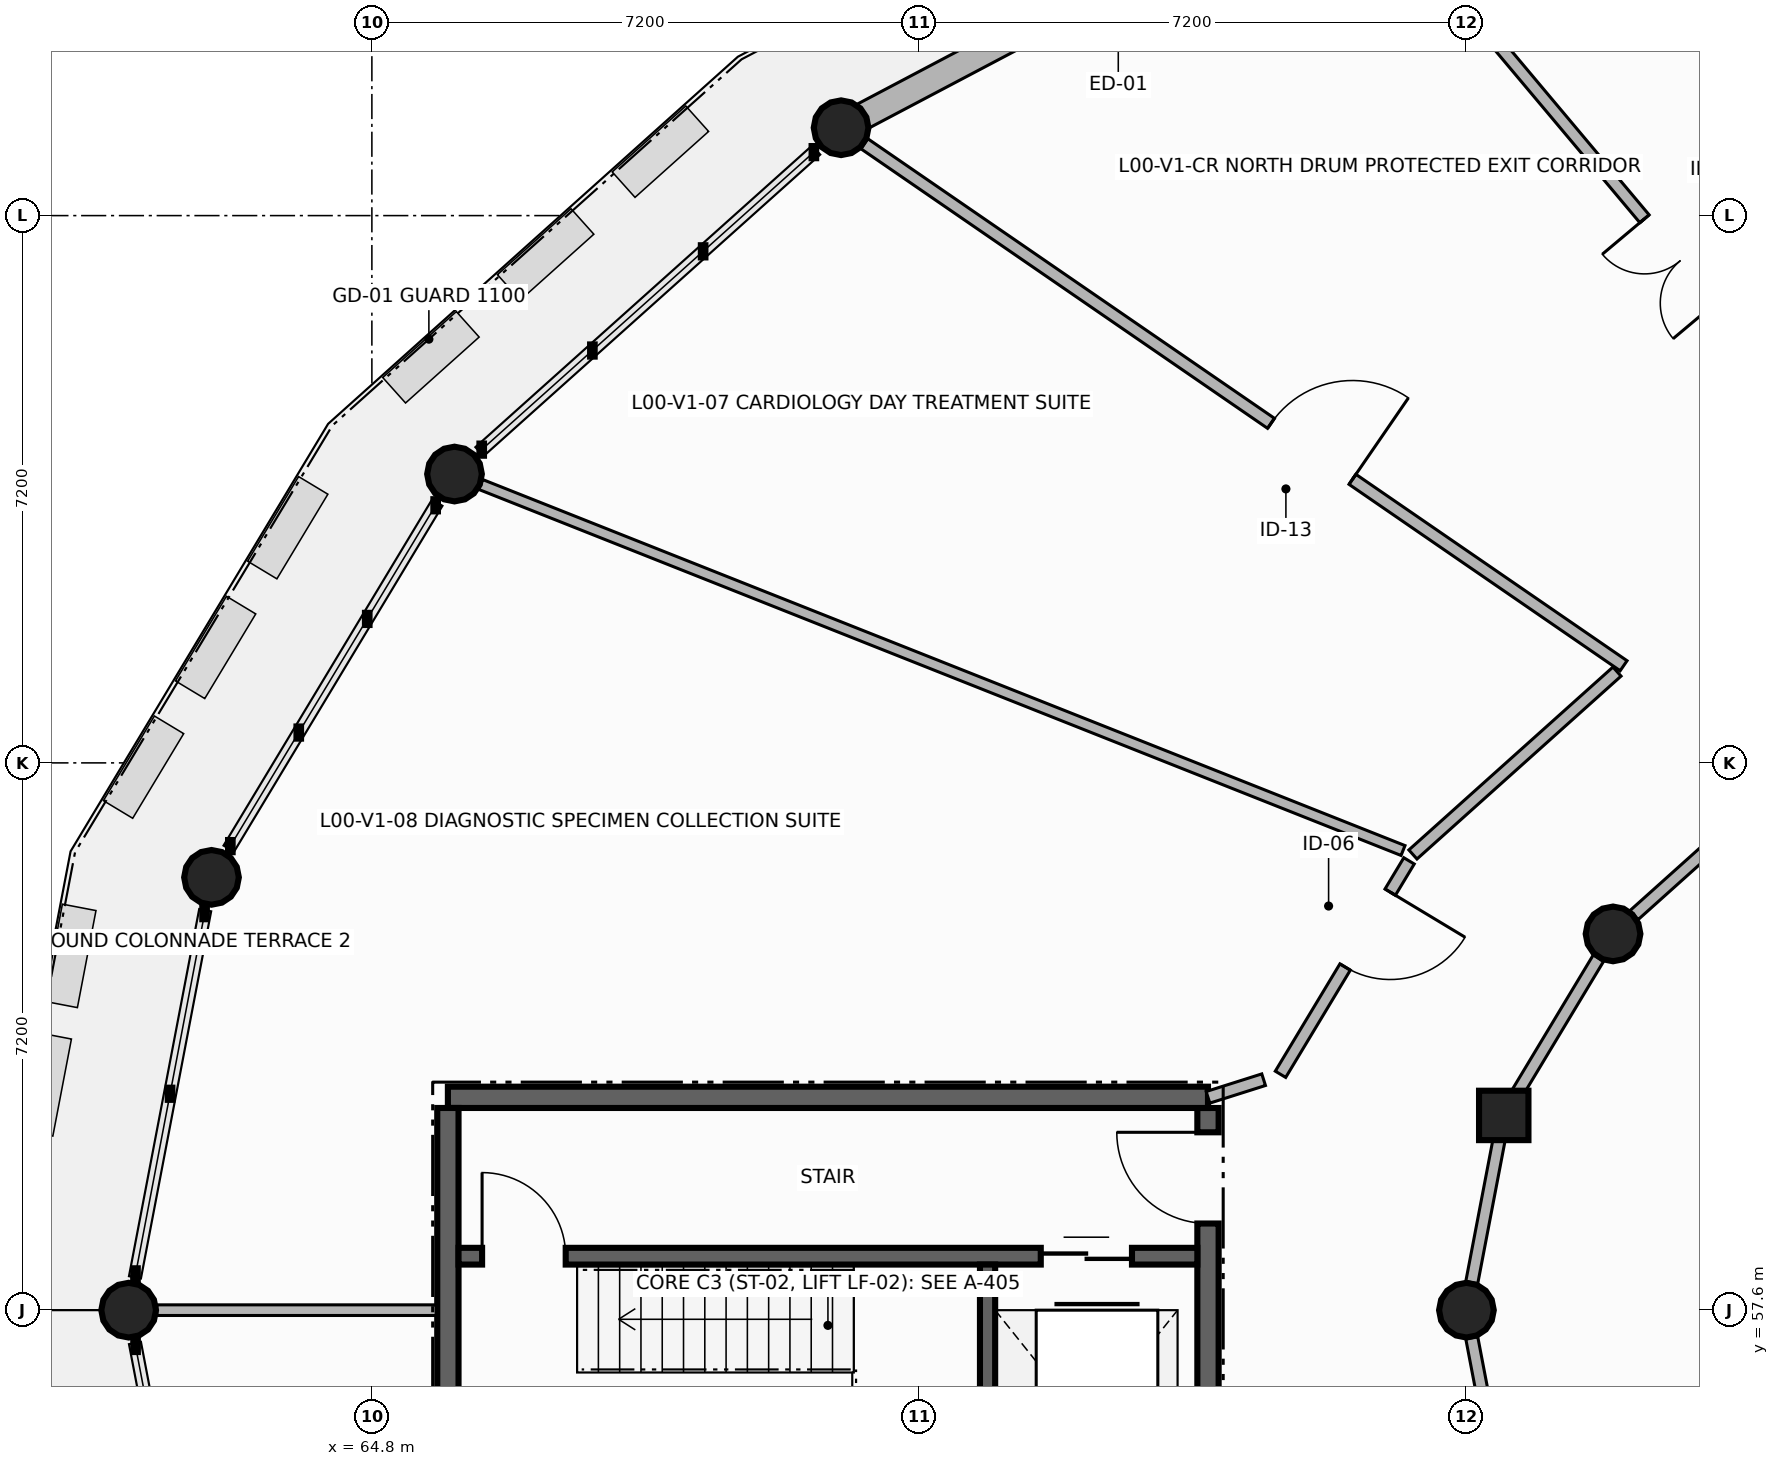
"""IFC4 building model, lengths in metres.
Left out: names, types, materials, properties, quantities, classifications, styles, units other than length and angle.
Written with IfcOpenShell. Run it as: python <this file> out.ifc"""

import sys

from ifc_helpers import new_model, si_unit, direction, frame, frame_2d, origin, origin_2d, place, context, subcontext, project, spatial, rectangle, circle, extrude, element, fill, save


model = new_model("IFC4")
c1 = context("Model", 3, precision=1e-05, world=origin(), true_north=direction((0.0, 1.0)))
c2 = subcontext(c1, "Body", "Model", "MODEL_VIEW")
j1 = project(units=[si_unit("LENGTHUNIT", "METRE"), si_unit("PLANEANGLEUNIT", "RADIAN")], contexts=[c1])
p1 = place(None, origin())
s1 = spatial("IfcSite", under=j1, at=p1, CompositionType="ELEMENT")
p2 = place(p1, origin())
s2 = spatial("IfcBuilding", under=s1, at=p2, CompositionType="ELEMENT")
p3 = place(p2, origin())
s3 = spatial("IfcBuildingStorey", under=s2, at=p3, CompositionType="ELEMENT", Elevation=0.0)
for number, where, z_axis, x_axis in (
    (1, (70.973, 73.156, -0.38), (0.0, 0.0, 1.0), (1.0, 0.0, 0.0)),
    (2, (65.887, 68.6, -0.38), (0.0, 0.0, 1.0), (1.0, 0.0, 0.0)),
    (3, (81.129, 62.55, -0.38), (0.0, 0.0, 1.0), (1.0, 0.0, 0.0)),
    (4, (62.69, 63.294, -0.38), (0.0, 0.0, 1.0), (1.0, 0.0, 0.0)),
):
    element("IfcColumn", number, at=place(p3, frame(where, z_axis=z_axis, x_axis=x_axis)), inside=s3, PredefinedType="COLUMN", context=c2, shape_type="SweptSolid", body=[
        extrude(circle(Radius=0.36, at=origin_2d()), origin(), (0.0, 0.0, 1.0), 4.59),
    ])
p4 = place(p3, frame((79.691, 60.162, -0.38), z_axis=(0.0, 0.0, 1.0), x_axis=(1.0, 0.0, 0.0)))
e5 = element("IfcColumn", 5, at=p4, inside=s3, PredefinedType="COLUMN", context=c2, shape_type="SweptSolid", body=[
    extrude(rectangle(XDim=0.65, YDim=0.65, at=origin_2d()), origin(), (0.0, 0.0, 1.0), 4.59),
])
for number, where, z_axis, x_axis in (
    (6, (61.6, 57.6, -0.38), (0.0, 0.0, 1.0), (1.0, 0.0, 0.0)),
    (7, (79.2, 57.6, -0.38), (0.0, 0.0, 1.0), (1.0, 0.0, 0.0)),
):
    element("IfcColumn", number, at=place(p3, frame(where, z_axis=z_axis, x_axis=x_axis)), inside=s3, PredefinedType="COLUMN", context=c2, shape_type="SweptSolid", body=[
        extrude(circle(Radius=0.36, at=origin_2d()), origin(), (0.0, 0.0, 1.0), 4.59),
    ])
p5 = place(p3, frame((77.6, 76.653, 0.0), z_axis=(0.0, 0.0, 1.0), x_axis=(-0.8844187475, -0.466694202954, 0.0)))
e8 = element("IfcWall", 8, at=p5, inside=s3, PredefinedType="SOLIDWALL", context=c2, shape_type="SweptSolid", body=[
    extrude(rectangle(XDim=7.493, YDim=0.35, at=frame_2d((3.747, 0.0))), origin(), (0.0, 0.0, 1.0), 3.65),
])
p6 = place(p5, frame((2.647, 0.0, 0.0)))
e9 = element("IfcOpeningElement", 9, at=p6, cuts=e8, PredefinedType="OPENING", context=c2, shape_type="SweptSolid", body=[
    extrude(rectangle(XDim=2.2, YDim=2.6, at=frame_2d((1.1, 1.3))), frame((0.0, 0.185, 0.0), z_axis=(0.0, -1.0, 0.0), x_axis=(1.0, 0.0, 0.0)), (0.0, 0.0, 1.0), 0.37),
])
p7 = place(p3, frame((75.8, 54.54, 0.0), z_axis=(0.0, 0.0, 1.0), x_axis=(0.0, 1.0, 0.0)))
e10 = element("IfcWall", 10, at=p7, inside=s3, PredefinedType="SHEAR", context=c2, shape_type="SweptSolid", body=[
    extrude(rectangle(XDim=5.72, YDim=0.28, at=frame_2d((2.86, 0.0))), origin(), (0.0, 0.0, 1.0), 4.21),
])
p8 = place(p7, frame((4.2, 0.0, 0.0)))
e11 = element("IfcOpeningElement", 11, at=p8, cuts=e10, PredefinedType="OPENING", context=c2, shape_type="SweptSolid", body=[
    extrude(rectangle(XDim=1.2, YDim=2.25, at=frame_2d((0.6, 1.125))), frame((0.0, 0.15, 0.0), z_axis=(0.0, -1.0, 0.0), x_axis=(1.0, 0.0, 0.0)), (0.0, 0.0, 1.0), 0.3),
])
p9 = place(p3, frame((75.8, 60.4, 0.0), z_axis=(0.0, 0.0, 1.0), x_axis=(-1.0, 0.0, 0.0)))
e12 = element("IfcWall", 12, at=p9, inside=s3, PredefinedType="SHEAR", context=c2, shape_type="SweptSolid", body=[
    extrude(rectangle(XDim=10.0, YDim=0.28, at=frame_2d((5.0, 0.0))), origin(), (0.0, 0.0, 1.0), 4.21),
])
p10 = place(p3, frame((65.8, 60.26, 0.0), z_axis=(0.0, 0.0, 1.0), x_axis=(0.0, -1.0, 0.0)))
e13 = element("IfcWall", 13, at=p10, inside=s3, PredefinedType="SHEAR", context=c2, shape_type="SweptSolid", body=[
    extrude(rectangle(XDim=5.72, YDim=0.28, at=frame_2d((2.86, 0.0))), origin(), (0.0, 0.0, 1.0), 4.21),
])
p11 = place(p3, frame((65.94, 58.31, 0.0), z_axis=(0.0, 0.0, 1.0), x_axis=(1.0, 0.0, 0.0)))
e14 = element("IfcWall", 14, at=p11, inside=s3, PredefinedType="SHEAR", context=c2, shape_type="SweptSolid", body=[
    extrude(rectangle(XDim=9.72, YDim=0.22, at=frame_2d((4.86, 0.0))), origin(), (0.0, 0.0, 1.0), 4.21),
])
p12 = place(p11, frame((0.31, 0.0, 0.0)))
e15 = element("IfcOpeningElement", 15, at=p12, cuts=e14, PredefinedType="OPENING", context=c2, shape_type="SweptSolid", body=[
    extrude(rectangle(XDim=1.1, YDim=2.15, at=frame_2d((0.55, 1.075))), frame((0.0, 0.12, 0.0), z_axis=(0.0, -1.0, 0.0), x_axis=(1.0, 0.0, 0.0)), (0.0, 0.0, 1.0), 0.24),
])
p13 = place(p11, frame((7.66, 0.0, 0.0)))
e16 = element("IfcOpeningElement", 16, at=p13, cuts=e14, PredefinedType="OPENING", context=c2, shape_type="SweptSolid", body=[
    extrude(rectangle(XDim=1.2, YDim=2.2, at=frame_2d((0.6, 1.1))), frame((0.0, 0.12, 0.0), z_axis=(0.0, -1.0, 0.0), x_axis=(1.0, 0.0, 0.0)), (0.0, 0.0, 1.0), 0.24),
])
p14 = place(p3, frame((72.9, 54.54, 0.0), z_axis=(0.0, 0.0, 1.0), x_axis=(0.0, 1.0, 0.0)))
e17 = element("IfcWall", 17, at=p14, inside=s3, PredefinedType="SHEAR", context=c2, shape_type="SweptSolid", body=[
    extrude(rectangle(XDim=3.66, YDim=0.2, at=frame_2d((1.83, 0.0))), origin(), (0.0, 0.0, 1.0), 4.21),
])
p15 = place(p3, frame((83.168, 64.377, 0.0), z_axis=(0.0, 0.0, 1.0), x_axis=(-0.744723202555, -0.667373472335, 0.0)))
e18 = element("IfcWall", 18, at=p15, inside=s3, PredefinedType="PARTITIONING", context=c2, shape_type="SweptSolid", body=[
    extrude(rectangle(XDim=2.367, YDim=0.16, at=frame_2d((1.184, 0.0))), origin(), (0.0, 0.0, 1.0), 3.59),
])
p16 = place(p3, frame((80.938, 62.233, 0.0), z_axis=(0.0, 0.0, 1.0), x_axis=(-0.515771112958, -0.856726420182, 0.0)))
e19 = element("IfcWall", 19, at=p16, inside=s3, PredefinedType="PARTITIONING", context=c2, shape_type="SweptSolid", body=[
    extrude(rectangle(XDim=2.082, YDim=0.16, at=frame_2d((1.041, 0.0))), origin(), (0.0, 0.0, 1.0), 3.59),
])
for number, where, z_axis, x_axis in (
    (20, (79.628, 59.833, 0.0), (0.0, 0.0, 1.0), (-0.188, -0.982, 0.0)),
    (21, (79.27, 57.237, 0.0), (0.0, 0.0, 1.0), (0.188, -0.982, 0.0)),
):
    element("IfcWall", number, at=place(p3, frame(where, z_axis=z_axis, x_axis=x_axis)), inside=s3, PredefinedType="PARTITIONING", context=c2, shape_type="SweptSolid", body=[
        extrude(rectangle(XDim=1.904, YDim=0.16, at=frame_2d((0.952, 0.0))), origin(), (0.0, 0.0, 1.0), 3.59),
    ])
p17 = place(p3, frame((84.791, 68.09, 0.0), z_axis=(0.0, 0.0, 1.0), x_axis=(-0.643078226154, 0.765800492978, 0.0)))
e22 = element("IfcWall", 22, at=p17, inside=s3, PredefinedType="PARTITIONING", context=c2, shape_type="SweptSolid", body=[
    extrude(rectangle(XDim=10.812, YDim=0.16, at=frame_2d((5.406, 0.0))), origin(), (0.0, 0.0, 1.0), 3.59),
])
p18 = place(p17, frame((3.601, 0.0, 0.0)))
e23 = element("IfcOpeningElement", 23, at=p18, cuts=e22, PredefinedType="OPENING", context=c2, shape_type="SweptSolid", body=[
    extrude(rectangle(XDim=1.45, YDim=2.25, at=frame_2d((0.725, 1.125))), frame((0.0, 0.09, 0.0), z_axis=(0.0, -1.0, 0.0), x_axis=(1.0, 0.0, 0.0)), (0.0, 0.0, 1.0), 0.18),
])
p19 = place(p3, frame((71.278, 72.946, 0.0), z_axis=(0.0, 0.0, 1.0), x_axis=(0.824040161424, -0.566531386915, 0.0)))
e24 = element("IfcWall", 24, at=p19, inside=s3, PredefinedType="PARTITIONING", context=c2, shape_type="SweptSolid", body=[
    extrude(rectangle(XDim=12.123, YDim=0.16, at=frame_2d((6.062, 0.0))), origin(), (0.0, 0.0, 1.0), 3.59),
])
p20 = place(p19, frame((6.494, 0.0, 0.0)))
e25 = element("IfcOpeningElement", 25, at=p20, cuts=e24, PredefinedType="OPENING", context=c2, shape_type="SweptSolid", body=[
    extrude(rectangle(XDim=1.3, YDim=2.25, at=frame_2d((0.65, 1.125))), frame((0.0, 0.09, 0.0), z_axis=(0.0, -1.0, 0.0), x_axis=(1.0, 0.0, 0.0)), (0.0, 0.0, 1.0), 0.18),
])
p21 = place(p3, frame((81.181, 66.001, 0.0), z_axis=(0.0, 0.0, 1.0), x_axis=(-0.744716826209, -0.667380587641, 0.0)))
e26 = element("IfcWall", 26, at=p21, inside=s3, PredefinedType="PARTITIONING", context=c2, shape_type="SweptSolid", body=[
    extrude(rectangle(XDim=3.605, YDim=0.16, at=frame_2d((1.803, 0.0))), origin(), (0.0, 0.0, 1.0), 3.59),
])
p22 = place(p3, frame((78.366, 63.647, 0.0), z_axis=(0.0, 0.0, 1.0), x_axis=(-0.929479211533, 0.368874498073, 0.0)))
e27 = element("IfcWall", 27, at=p22, inside=s3, PredefinedType="PARTITIONING", context=c2, shape_type="SweptSolid", body=[
    extrude(rectangle(XDim=13.056, YDim=0.14, at=frame_2d((6.528, 0.0))), origin(), (0.0, 0.0, 1.0), 3.59),
])
p23 = place(p3, frame((65.645, 57.6, 0.0), z_axis=(0.0, 0.0, 1.0), x_axis=(-1.0, 0.0, 0.0)))
e28 = element("IfcWall", 28, at=p23, inside=s3, PredefinedType="PARTITIONING", context=c2, shape_type="SweptSolid", body=[
    extrude(rectangle(XDim=3.675, YDim=0.14, at=frame_2d((1.837, 0.0))), origin(), (0.0, 0.0, 1.0), 3.59),
])
p24 = place(p3, frame((78.445, 63.511, 0.0), z_axis=(0.0, 0.0, 1.0), x_axis=(-0.515907945316, -0.856644028731, 0.0)))
e29 = element("IfcWall", 29, at=p24, inside=s3, PredefinedType="PARTITIONING", context=c2, shape_type="SweptSolid", body=[
    extrude(rectangle(XDim=3.278, YDim=0.16, at=frame_2d((1.639, 0.0))), origin(), (0.0, 0.0, 1.0), 3.59),
])
p25 = place(p24, frame((0.48, 0.0, 0.0)))
e30 = element("IfcOpeningElement", 30, at=p25, cuts=e29, PredefinedType="OPENING", context=c2, shape_type="SweptSolid", body=[
    extrude(rectangle(XDim=1.15, YDim=2.25, at=frame_2d((0.575, 1.125))), frame((0.0, 0.09, 0.0), z_axis=(0.0, -1.0, 0.0), x_axis=(1.0, 0.0, 0.0)), (0.0, 0.0, 1.0), 0.18),
])
p26 = place(p3, frame((76.532, 60.632, 0.0), z_axis=(0.0, 0.0, 1.0), x_axis=(-0.953192648892, -0.302363645463, 0.0)))
e31 = element("IfcWall", 31, at=p26, inside=s3, PredefinedType="PARTITIONING", context=c2, shape_type="SweptSolid", body=[
    extrude(rectangle(XDim=0.768, YDim=0.16, at=frame_2d((0.384, 0.0))), origin(), (0.0, 0.0, 1.0), 3.59),
])
p27 = place(p12, origin())
e32 = element("IfcDoor", 32, at=p27, inside=s3, OperationType="SINGLE_SWING_LEFT", PredefinedType="DOOR", context=c2, shape_type="SweptSolid", body=[
    extrude(rectangle(XDim=1.1, YDim=2.15, at=frame_2d((0.55, 1.075))), frame((0.0, 0.025, 0.0), z_axis=(0.0, -1.0, 0.0), x_axis=(1.0, 0.0, 0.0)), (0.0, 0.0, 1.0), 0.05),
])
fill(e15, e32)
p28 = place(p13, origin())
e33 = element("IfcDoor", 33, at=p28, inside=s3, OperationType="DOUBLE_DOOR_SLIDING", PredefinedType="DOOR", context=c2, shape_type="SweptSolid", body=[
    extrude(rectangle(XDim=1.2, YDim=2.2, at=frame_2d((0.6, 1.1))), frame((0.0, 0.025, 0.0), z_axis=(0.0, -1.0, 0.0), x_axis=(1.0, 0.0, 0.0)), (0.0, 0.0, 1.0), 0.05),
])
fill(e16, e33)
p29 = place(p8, origin())
e34 = element("IfcDoor", 34, at=p29, inside=s3, OperationType="SINGLE_SWING_RIGHT", PredefinedType="DOOR", context=c2, shape_type="SweptSolid", body=[
    extrude(rectangle(XDim=1.2, YDim=2.25, at=frame_2d((0.6, 1.125))), frame((0.0, 0.025, 0.0), z_axis=(0.0, -1.0, 0.0), x_axis=(1.0, 0.0, 0.0)), (0.0, 0.0, 1.0), 0.05),
])
fill(e11, e34)
p30 = place(p18, origin())
e35 = element("IfcDoor", 35, at=p30, inside=s3, OperationType="DOUBLE_DOOR_SINGLE_SWING", PredefinedType="DOOR", context=c2, shape_type="SweptSolid", body=[
    extrude(rectangle(XDim=1.45, YDim=2.25, at=frame_2d((0.725, 1.125))), frame((0.0, 0.025, 0.0), z_axis=(0.0, -1.0, 0.0), x_axis=(1.0, 0.0, 0.0)), (0.0, 0.0, 1.0), 0.05),
])
fill(e23, e35)
p31 = place(p20, origin())
e36 = element("IfcDoor", 36, at=p31, inside=s3, OperationType="SINGLE_SWING_RIGHT", PredefinedType="DOOR", context=c2, shape_type="SweptSolid", body=[
    extrude(rectangle(XDim=1.3, YDim=2.25, at=frame_2d((0.65, 1.125))), frame((0.0, 0.025, 0.0), z_axis=(0.0, -1.0, 0.0), x_axis=(1.0, 0.0, 0.0)), (0.0, 0.0, 1.0), 0.05),
])
fill(e25, e36)
p32 = place(p25, origin())
e37 = element("IfcDoor", 37, at=p32, inside=s3, OperationType="SINGLE_SWING_LEFT", PredefinedType="DOOR", context=c2, shape_type="SweptSolid", body=[
    extrude(rectangle(XDim=1.15, YDim=2.25, at=frame_2d((0.575, 1.125))), frame((0.0, 0.025, 0.0), z_axis=(0.0, -1.0, 0.0), x_axis=(1.0, 0.0, 0.0)), (0.0, 0.0, 1.0), 0.05),
])
fill(e30, e37)
save(model, sys.argv[1])
